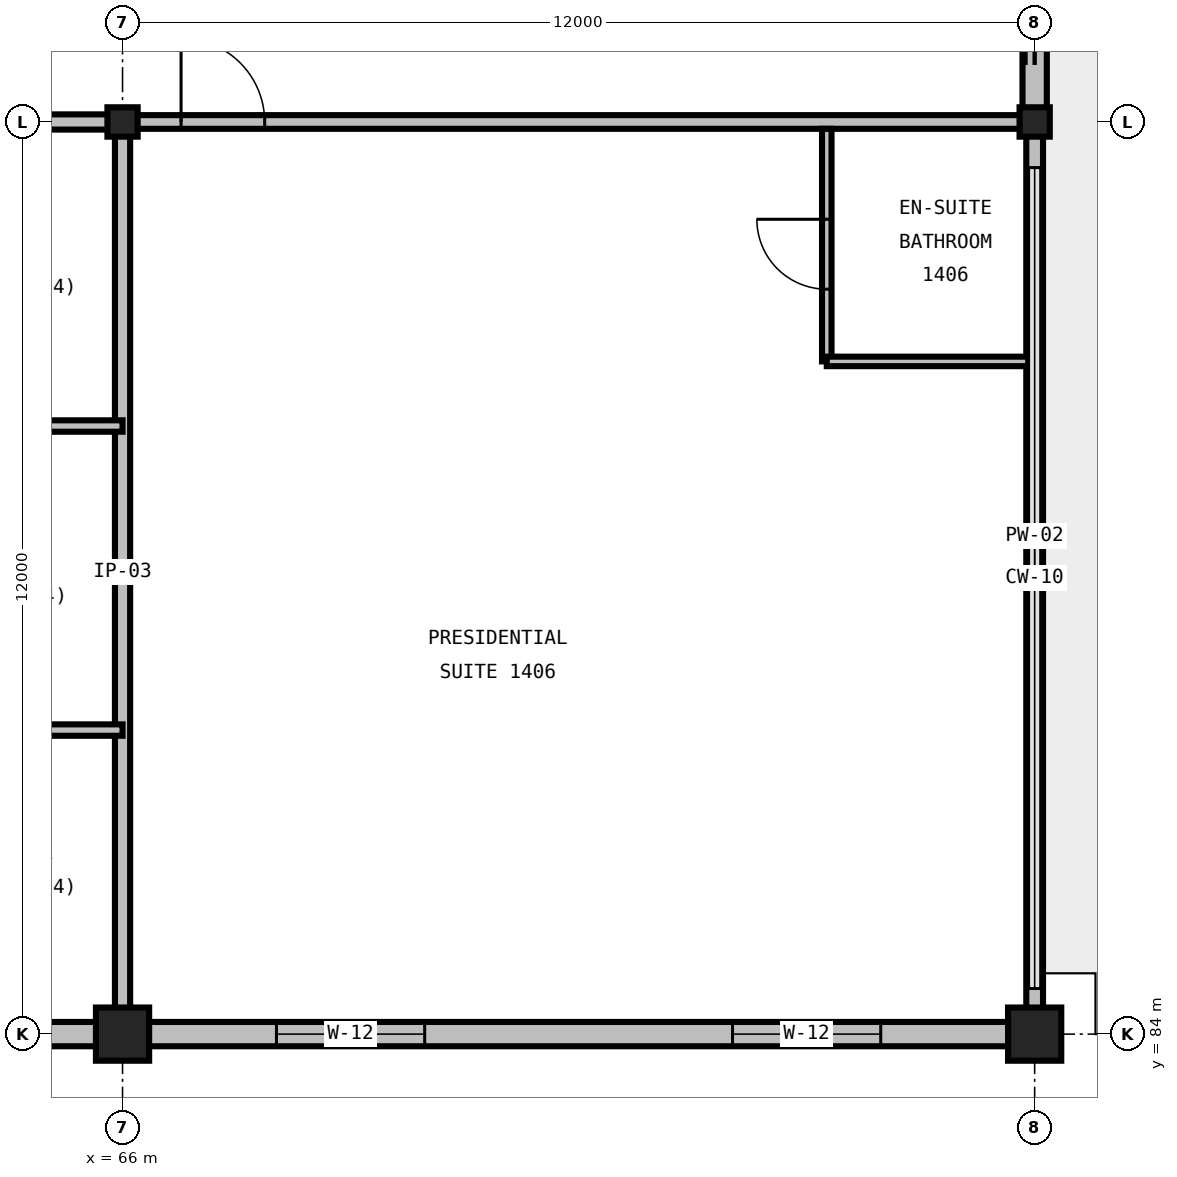
"""IFC4 building model, lengths in metres.
Left out: names, types, materials, properties, quantities, classifications, styles, units other than length and angle.
Written with IfcOpenShell. Run it as: python <this file> out.ifc"""

import sys

from ifc_helpers import new_model, si_unit, direction, frame, frame_2d, origin, origin_2d, place, context, subcontext, project, spatial, rectangle, i_section, extrude, element, fill, save


model = new_model("IFC4")
c1 = context("Model", 3, precision=1e-05, world=origin(), true_north=direction((0.0, 1.0)))
c2 = subcontext(c1, "Body", "Model", "MODEL_VIEW")
j1 = project(units=[si_unit("LENGTHUNIT", "METRE"), si_unit("PLANEANGLEUNIT", "RADIAN")], contexts=[c1])
p1 = place(None, origin())
s1 = spatial("IfcSite", under=j1, at=p1, CompositionType="ELEMENT")
p2 = place(p1, origin())
s2 = spatial("IfcBuilding", under=s1, at=p2, CompositionType="ELEMENT")
p3 = place(p2, frame((0.0, 0.0, 60.0)))
s3 = spatial("IfcBuildingStorey", under=s2, at=p3, CompositionType="ELEMENT", Elevation=60.0)
p4 = place(p3, frame((66.0, 84.0, 0.0), z_axis=(0.0, 0.0, 1.0), x_axis=(1.0, 0.0, 0.0)))
e1 = element("IfcColumn", 1, at=p4, inside=s3, PredefinedType="COLUMN", context=c2, shape_type="SweptSolid", body=[
    extrude(rectangle(XDim=0.7, YDim=0.7, at=origin_2d()), origin(), (0.0, 0.0, 1.0), 3.6),
])
p5 = place(p3, frame((66.0, 96.0, 0.0), z_axis=(0.0, 0.0, 1.0), x_axis=(1.0, 0.0, 0.0)))
e2 = element("IfcColumn", 2, at=p5, inside=s3, PredefinedType="COLUMN", context=c2, shape_type="SweptSolid", body=[
    extrude(i_section(OverallWidth=0.398, OverallDepth=0.387, WebThickness=0.021, FlangeThickness=0.033, FilletRadius=0.031, at=origin_2d()), origin(), (0.0, 0.0, 1.0), 3.6),
])
p6 = place(p3, frame((78.0, 84.0, 0.0), z_axis=(0.0, 0.0, 1.0), x_axis=(1.0, 0.0, 0.0)))
e3 = element("IfcColumn", 3, at=p6, inside=s3, PredefinedType="COLUMN", context=c2, shape_type="SweptSolid", body=[
    extrude(rectangle(XDim=0.7, YDim=0.7, at=origin_2d()), origin(), (0.0, 0.0, 1.0), 3.6),
])
p7 = place(p3, frame((78.0, 96.0, 0.0), z_axis=(0.0, 0.0, 1.0), x_axis=(1.0, 0.0, 0.0)))
e4 = element("IfcColumn", 4, at=p7, inside=s3, PredefinedType="COLUMN", context=c2, shape_type="SweptSolid", body=[
    extrude(i_section(OverallWidth=0.398, OverallDepth=0.387, WebThickness=0.021, FlangeThickness=0.033, FilletRadius=0.031, at=origin_2d()), origin(), (0.0, 0.0, 1.0), 3.6),
])
p8 = place(p3, frame((54.0, 84.0, 0.0), z_axis=(0.0, 0.0, 1.0), x_axis=(1.0, 0.0, 0.0)))
e5 = element("IfcWall", 5, at=p8, inside=s3, PredefinedType="STANDARD", context=c2, shape_type="SweptSolid", body=[
    extrude(rectangle(XDim=12.0, YDim=0.32, at=frame_2d((6.0, 0.0))), origin(), (0.0, 0.0, 1.0), 2.536),
])
p9 = place(p8, frame((2.3, 0.0, 1.0)))
e6 = element("IfcOpeningElement", 6, at=p9, cuts=e5, PredefinedType="OPENING", context=c2, shape_type="SweptSolid", body=[
    extrude(rectangle(XDim=1.4, YDim=1.4, at=frame_2d((0.7, 0.7))), frame((0.0, 0.175, 0.0), z_axis=(0.0, -1.0, 0.0), x_axis=(1.0, 0.0, 0.0)), (0.0, 0.0, 1.0), 0.35),
])
p10 = place(p8, frame((8.25, 0.0, 1.0)))
e7 = element("IfcOpeningElement", 7, at=p10, cuts=e5, PredefinedType="OPENING", context=c2, shape_type="SweptSolid", body=[
    extrude(rectangle(XDim=1.5, YDim=1.35, at=frame_2d((0.75, 0.675))), frame((0.0, 0.175, 0.0), z_axis=(0.0, -1.0, 0.0), x_axis=(1.0, 0.0, 0.0)), (0.0, 0.0, 1.0), 0.35),
])
p11 = place(p3, frame((66.0, 84.0, 0.0), z_axis=(0.0, 0.0, 1.0), x_axis=(1.0, 0.0, 0.0)))
e8 = element("IfcWall", 8, at=p11, inside=s3, PredefinedType="STANDARD", context=c2, shape_type="SweptSolid", body=[
    extrude(rectangle(XDim=12.0, YDim=0.32, at=frame_2d((6.0, 0.0))), origin(), (0.0, 0.0, 1.0), 2.536),
])
p12 = place(p11, frame((2.025, 0.0, 0.65)))
e9 = element("IfcOpeningElement", 9, at=p12, cuts=e8, PredefinedType="OPENING", context=c2, shape_type="SweptSolid", body=[
    extrude(rectangle(XDim=1.95, YDim=1.55, at=frame_2d((0.975, 0.775))), frame((0.0, 0.175, 0.0), z_axis=(0.0, -1.0, 0.0), x_axis=(1.0, 0.0, 0.0)), (0.0, 0.0, 1.0), 0.35),
])
p13 = place(p11, frame((8.025, 0.0, 0.65)))
e10 = element("IfcOpeningElement", 10, at=p13, cuts=e8, PredefinedType="OPENING", context=c2, shape_type="SweptSolid", body=[
    extrude(rectangle(XDim=1.95, YDim=1.55, at=frame_2d((0.975, 0.775))), frame((0.0, 0.175, 0.0), z_axis=(0.0, -1.0, 0.0), x_axis=(1.0, 0.0, 0.0)), (0.0, 0.0, 1.0), 0.35),
])
p14 = place(p3, frame((78.0, 84.0, 0.0), z_axis=(0.0, 0.0, 1.0), x_axis=(0.0, 1.0, 0.0)))
e11 = element("IfcWall", 11, at=p14, inside=s3, PredefinedType="PARAPET", context=c2, shape_type="SweptSolid", body=[
    extrude(rectangle(XDim=12.0, YDim=0.22, at=frame_2d((6.0, 0.0))), origin(), (0.0, 0.0, 1.0), 0.2),
])
p15 = place(p3, frame((78.0, 96.0, 0.0), z_axis=(0.0, 0.0, 1.0), x_axis=(0.0, 1.0, 0.0)))
e12 = element("IfcWall", 12, at=p15, inside=s3, PredefinedType="STANDARD", context=c2, shape_type="SweptSolid", body=[
    extrude(rectangle(XDim=9.0, YDim=0.32, at=frame_2d((4.5, 0.0))), origin(), (0.0, 0.0, 1.0), 2.981),
])
p16 = place(p15, frame((0.75, 0.0, 0.0)))
e13 = element("IfcOpeningElement", 13, at=p16, cuts=e12, PredefinedType="OPENING", context=c2, shape_type="SweptSolid", body=[
    extrude(rectangle(XDim=1.5, YDim=2.15, at=frame_2d((0.75, 1.075))), frame((0.0, 0.175, 0.0), z_axis=(0.0, -1.0, 0.0), x_axis=(1.0, 0.0, 0.0)), (0.0, 0.0, 1.0), 0.35),
])
p17 = place(p3, frame((66.0, 84.16, 0.0), z_axis=(0.0, 0.0, 1.0), x_axis=(0.0, 1.0, 0.0)))
e14 = element("IfcWall", 14, at=p17, inside=s3, PredefinedType="PARTITIONING", context=c2, shape_type="SweptSolid", body=[
    extrude(rectangle(XDim=11.84, YDim=0.2, at=frame_2d((5.92, 0.0))), origin(), (0.0, 0.0, 1.0), 2.59),
])
p18 = place(p3, frame((60.8, 96.0, 0.0), z_axis=(0.0, 0.0, 1.0), x_axis=(1.0, 0.0, 0.0)))
e15 = element("IfcWall", 15, at=p18, inside=s3, PredefinedType="PARTITIONING", context=c2, shape_type="SweptSolid", body=[
    extrude(rectangle(XDim=5.2, YDim=0.2, at=frame_2d((2.6, 0.0))), origin(), (0.0, 0.0, 1.0), 2.359),
])
for number, where, z_axis, x_axis in (
    (16, (60.8, 88.0, 0.0), (0.0, 0.0, 1.0), (1.0, 0.0, 0.0)),
    (17, (60.8, 92.0, 0.0), (0.0, 0.0, 1.0), (1.0, 0.0, 0.0)),
):
    element("IfcWall", number, at=place(p3, frame(where, z_axis=z_axis, x_axis=x_axis)), inside=s3, PredefinedType="PARTITIONING", context=c2, shape_type="SweptSolid", body=[
        extrude(rectangle(XDim=5.2, YDim=0.15, at=frame_2d((2.6, 0.0))), origin(), (0.0, 0.0, 1.0), 3.29),
    ])
p19 = place(p3, frame((66.0, 96.0, 0.0), z_axis=(0.0, 0.0, 1.0), x_axis=(1.0, 0.0, 0.0)))
e18 = element("IfcWall", 18, at=p19, inside=s3, PredefinedType="PARTITIONING", context=c2, shape_type="SweptSolid", body=[
    extrude(rectangle(XDim=11.915, YDim=0.18, at=frame_2d((5.957, 0.0))), origin(), (0.0, 0.0, 1.0), 2.664),
])
p20 = place(p19, frame((0.77, 0.0, 0.0)))
e19 = element("IfcOpeningElement", 19, at=p20, cuts=e18, PredefinedType="OPENING", context=c2, shape_type="SweptSolid", body=[
    extrude(rectangle(XDim=1.1, YDim=2.2, at=frame_2d((0.55, 1.1))), frame((0.0, 0.105, 0.0), z_axis=(0.0, -1.0, 0.0), x_axis=(1.0, 0.0, 0.0)), (0.0, 0.0, 1.0), 0.21),
])
p21 = place(p3, frame((75.265, 92.85, 0.0), z_axis=(0.0, 0.0, 1.0), x_axis=(0.0, 1.0, 0.0)))
e20 = element("IfcWall", 20, at=p21, inside=s3, PredefinedType="PARTITIONING", context=c2, shape_type="SweptSolid", body=[
    extrude(rectangle(XDim=3.06, YDim=0.125, at=frame_2d((1.53, 0.0))), origin(), (0.0, 0.0, 1.0), 3.29),
])
p22 = place(p21, frame((0.95, 0.0, 0.0)))
e21 = element("IfcOpeningElement", 21, at=p22, cuts=e20, PredefinedType="OPENING", context=c2, shape_type="SweptSolid", body=[
    extrude(rectangle(XDim=0.92, YDim=2.1, at=frame_2d((0.46, 1.05))), frame((0.0, 0.077, 0.0), z_axis=(0.0, -1.0, 0.0), x_axis=(1.0, 0.0, 0.0)), (0.0, 0.0, 1.0), 0.155),
])
p23 = place(p3, frame((75.265, 92.85, 0.0), z_axis=(0.0, 0.0, 1.0), x_axis=(1.0, 0.0, 0.0)))
e22 = element("IfcWall", 22, at=p23, inside=s3, PredefinedType="PARTITIONING", context=c2, shape_type="SweptSolid", body=[
    extrude(rectangle(XDim=2.65, YDim=0.125, at=frame_2d((1.325, 0.0))), origin(), (0.0, 0.0, 1.0), 3.29),
])
p24 = place(p12, origin())
e23 = element("IfcWindow", 23, at=p24, inside=s3, PartitioningType="DOUBLE_PANEL_VERTICAL", PredefinedType="WINDOW", context=c2, shape_type="SweptSolid", body=[
    extrude(rectangle(XDim=1.95, YDim=1.55, at=frame_2d((0.975, 0.775))), frame((0.0, 0.03, 0.0), z_axis=(0.0, -1.0, 0.0), x_axis=(1.0, 0.0, 0.0)), (0.0, 0.0, 1.0), 0.06),
])
fill(e9, e23)
p25 = place(p13, origin())
e24 = element("IfcWindow", 24, at=p25, inside=s3, PartitioningType="DOUBLE_PANEL_VERTICAL", PredefinedType="WINDOW", context=c2, shape_type="SweptSolid", body=[
    extrude(rectangle(XDim=1.95, YDim=1.55, at=frame_2d((0.975, 0.775))), frame((0.0, 0.03, 0.0), z_axis=(0.0, -1.0, 0.0), x_axis=(1.0, 0.0, 0.0)), (0.0, 0.0, 1.0), 0.06),
])
fill(e10, e24)
p26 = place(p16, origin())
e25 = element("IfcDoor", 25, at=p26, inside=s3, OperationType="DOUBLE_DOOR_SLIDING", PredefinedType="DOOR", context=c2, shape_type="SweptSolid", body=[
    extrude(rectangle(XDim=1.5, YDim=2.15, at=frame_2d((0.75, 1.075))), frame((0.0, 0.025, 0.0), z_axis=(0.0, -1.0, 0.0), x_axis=(1.0, 0.0, 0.0)), (0.0, 0.0, 1.0), 0.05),
])
fill(e13, e25)
p27 = place(p20, origin())
e26 = element("IfcDoor", 26, at=p27, inside=s3, OperationType="SINGLE_SWING_LEFT", PredefinedType="DOOR", context=c2, shape_type="SweptSolid", body=[
    extrude(rectangle(XDim=1.1, YDim=2.2, at=frame_2d((0.55, 1.1))), frame((0.0, 0.025, 0.0), z_axis=(0.0, -1.0, 0.0), x_axis=(1.0, 0.0, 0.0)), (0.0, 0.0, 1.0), 0.05),
])
fill(e19, e26)
p28 = place(p22, origin())
e27 = element("IfcDoor", 27, at=p28, inside=s3, OperationType="SINGLE_SWING_RIGHT", PredefinedType="DOOR", context=c2, shape_type="SweptSolid", body=[
    extrude(rectangle(XDim=0.92, YDim=2.1, at=frame_2d((0.46, 1.05))), frame((0.0, 0.025, 0.0), z_axis=(0.0, -1.0, 0.0), x_axis=(1.0, 0.0, 0.0)), (0.0, 0.0, 1.0), 0.05),
])
fill(e21, e27)
save(model, sys.argv[1])
